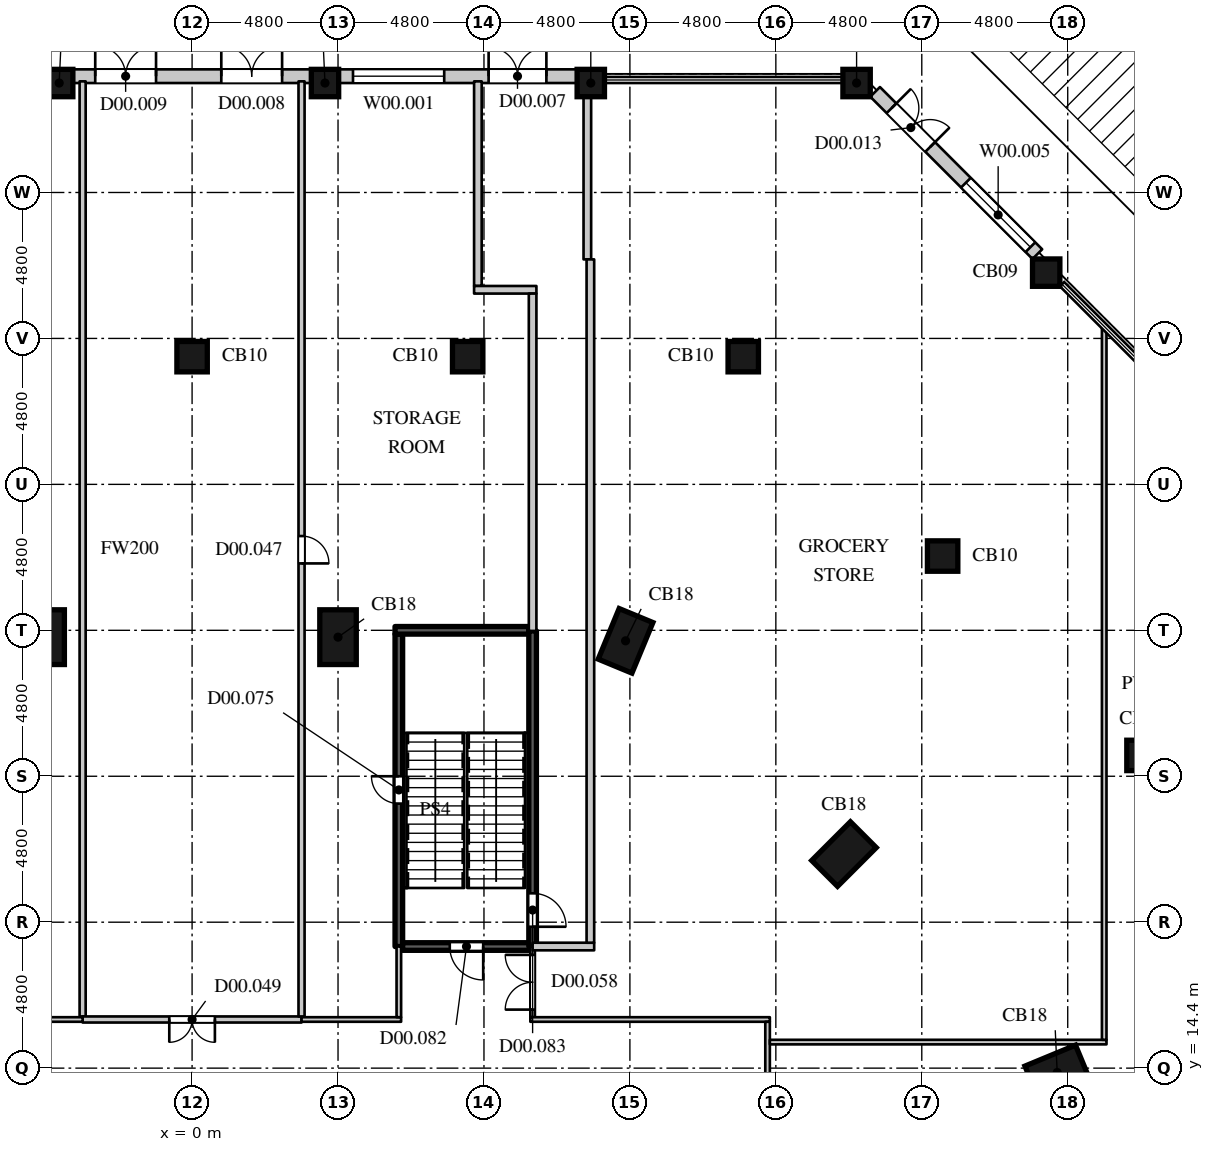
"""IFC4 building model, lengths in metres.
Left out: names, types, materials, properties, quantities, classifications, styles, units other than length and angle.
Written with IfcOpenShell. Run it as: python <this file> out.ifc"""

import sys

from ifc_helpers import new_model, si_unit, direction, frame, frame_2d, origin, origin_2d, place, context, subcontext, project, spatial, rectangle, extrude, element, fill, save


model = new_model("IFC4")
c1 = context("Model", 3, precision=1e-05, world=origin(), true_north=direction((0.0, 1.0)))
c2 = subcontext(c1, "Body", "Model", "MODEL_VIEW")
j1 = project(units=[si_unit("LENGTHUNIT", "METRE"), si_unit("PLANEANGLEUNIT", "RADIAN")], contexts=[c1])
p1 = place(None, origin())
s1 = spatial("IfcSite", under=j1, at=p1, CompositionType="ELEMENT")
p2 = place(p1, origin())
s2 = spatial("IfcBuilding", under=s1, at=p2, CompositionType="ELEMENT")
p3 = place(p2, origin())
s3 = spatial("IfcBuildingStorey", under=s2, at=p3, CompositionType="ELEMENT", Elevation=0.0)
for number, where, z_axis, x_axis in (
    (1, (28.454, 14.257, 0.0), (0.0, 0.0, 1.0), (-0.383, 0.924, 0.0)),
    (2, (21.441, 21.441, 0.0), (0.0, 0.0, 1.0), (-0.707, 0.707, 0.0)),
):
    element("IfcColumn", number, at=place(p3, frame(where, z_axis=z_axis, x_axis=x_axis)), inside=s3, PredefinedType="COLUMN", context=c2, shape_type="SweptSolid", body=[
        extrude(rectangle(XDim=1.2, YDim=1.8, at=origin_2d()), origin(), (0.0, 0.0, 1.0), 6.0),
    ])
p4 = place(p3, frame((31.243, 24.685, 0.0), z_axis=(0.0, 0.0, 1.0), x_axis=(1.0, 0.0, 0.0)))
e3 = element("IfcColumn", 3, at=p4, inside=s3, PredefinedType="COLUMN", context=c2, shape_type="SweptSolid", body=[
    extrude(rectangle(XDim=1.0, YDim=1.0, at=origin_2d()), origin(), (0.0, 0.0, 1.0), 6.0),
])
for number, where, z_axis, x_axis in (
    (4, (14.257, 28.454, 0.0), (0.0, 0.0, 1.0), (-0.924, 0.383, 0.0)),
    (5, (-4.8, 28.575, 0.0), (0.0, 0.0, 1.0), (-1.0, 0.0, 0.0)),
    (6, (4.8, 28.575, 0.0), (0.0, 0.0, 1.0), (-1.0, 0.0, 0.0)),
):
    element("IfcColumn", number, at=place(p3, frame(where, z_axis=z_axis, x_axis=x_axis)), inside=s3, PredefinedType="COLUMN", context=c2, shape_type="SweptSolid", body=[
        extrude(rectangle(XDim=1.2, YDim=1.8, at=origin_2d()), origin(), (0.0, 0.0, 1.0), 6.0),
    ])
for number, where, z_axis, x_axis in (
    (7, (24.685, 31.243, 0.0), (0.0, 0.0, 1.0), (1.0, 0.0, 0.0)),
    (8, (0.0, 37.8, 0.0), (0.0, 0.0, 1.0), (1.0, 0.0, 0.0)),
    (9, (9.064, 37.8, 0.0), (0.0, 0.0, 1.0), (1.0, 0.0, 0.0)),
    (10, (18.128, 37.8, 0.0), (0.0, 0.0, 1.0), (1.0, 0.0, 0.0)),
):
    element("IfcColumn", number, at=place(p3, frame(where, z_axis=z_axis, x_axis=x_axis)), inside=s3, PredefinedType="COLUMN", context=c2, shape_type="SweptSolid", body=[
        extrude(rectangle(XDim=1.0, YDim=1.0, at=origin_2d()), origin(), (0.0, 0.0, 1.0), 6.0),
    ])
for number, where, z_axis, x_axis in (
    (11, (28.092, 40.564, 0.0), (0.0, 0.0, 1.0), (1.0, 0.0, 0.0)),
    (12, (-4.371, 46.8, 0.0), (0.0, 0.0, 1.0), (1.0, 0.0, 0.0)),
    (13, (4.371, 46.8, 0.0), (0.0, 0.0, 1.0), (1.0, 0.0, 0.0)),
    (14, (13.114, 46.8, 0.0), (0.0, 0.0, 1.0), (1.0, 0.0, 0.0)),
    (15, (21.856, 46.8, 0.0), (0.0, 0.0, 1.0), (1.0, 0.0, 0.0)),
):
    element("IfcColumn", number, at=place(p3, frame(where, z_axis=z_axis, x_axis=x_axis)), inside=s3, PredefinedType="COLUMN", context=c2, shape_type="SweptSolid", body=[
        extrude(rectangle(XDim=0.9, YDim=0.9, at=origin_2d()), origin(), (0.0, 0.0, 1.0), 6.0),
    ])
p5 = place(p3, frame((27.801, 41.173, 0.0), z_axis=(0.0, 0.0, 1.0), x_axis=(-0.707122957123, 0.70709060488, 0.0)))
e16 = element("IfcWall", 16, at=p5, inside=s3, PredefinedType="ELEMENTEDWALL", context=c2, shape_type="SweptSolid", body=[
    extrude(rectangle(XDim=7.546, YDim=0.45, at=frame_2d((3.773, 0.0))), origin(), (0.0, 0.0, 1.0), 4.8),
])
p6 = place(p5, frame((0.323, 0.0, 1.05)))
e17 = element("IfcOpeningElement", 17, at=p6, cuts=e16, PredefinedType="OPENING", context=c2, shape_type="SweptSolid", body=[
    extrude(rectangle(XDim=3.0, YDim=2.7, at=frame_2d((1.5, 1.35))), frame((0.0, 0.235, 0.0), z_axis=(0.0, -1.0, 0.0), x_axis=(1.0, 0.0, 0.0)), (0.0, 0.0, 1.0), 0.47),
])
p7 = place(p5, frame((4.985, 0.0, 0.0)))
e18 = element("IfcOpeningElement", 18, at=p7, cuts=e16, PredefinedType="OPENING", context=c2, shape_type="SweptSolid", body=[
    extrude(rectangle(XDim=1.8, YDim=2.7, at=frame_2d((0.9, 1.35))), frame((0.0, 0.235, 0.0), z_axis=(0.0, -1.0, 0.0), x_axis=(1.0, 0.0, 0.0)), (0.0, 0.0, 1.0), 0.47),
])
p8 = place(p3, frame((12.664, 47.025, 0.0), z_axis=(0.0, 0.0, 1.0), x_axis=(-1.0, 0.0, 0.0)))
e19 = element("IfcWall", 19, at=p8, inside=s3, PredefinedType="ELEMENTEDWALL", context=c2, shape_type="SweptSolid", body=[
    extrude(rectangle(XDim=7.842, YDim=0.45, at=frame_2d((3.921, 0.0))), origin(), (0.0, 0.0, 1.0), 4.8),
])
p9 = place(p8, frame((1.01, 0.0, 0.0)))
e20 = element("IfcOpeningElement", 20, at=p9, cuts=e19, PredefinedType="OPENING", context=c2, shape_type="SweptSolid", body=[
    extrude(rectangle(XDim=1.9, YDim=2.7, at=frame_2d((0.95, 1.35))), frame((0.0, 0.235, 0.0), z_axis=(0.0, -1.0, 0.0), x_axis=(1.0, 0.0, 0.0)), (0.0, 0.0, 1.0), 0.47),
])
p10 = place(p8, frame((4.371, 0.0, 1.05)))
e21 = element("IfcOpeningElement", 21, at=p10, cuts=e19, PredefinedType="OPENING", context=c2, shape_type="SweptSolid", body=[
    extrude(rectangle(XDim=3.0, YDim=2.7, at=frame_2d((1.5, 1.35))), frame((0.0, 0.235, 0.0), z_axis=(0.0, -1.0, 0.0), x_axis=(1.0, 0.0, 0.0)), (0.0, 0.0, 1.0), 0.47),
])
p11 = place(p3, frame((3.921, 47.025, 0.0), z_axis=(0.0, 0.0, 1.0), x_axis=(-1.0, 0.0, 0.0)))
e22 = element("IfcWall", 22, at=p11, inside=s3, PredefinedType="ELEMENTEDWALL", context=c2, shape_type="SweptSolid", body=[
    extrude(rectangle(XDim=7.842, YDim=0.45, at=frame_2d((3.921, 0.0))), origin(), (0.0, 0.0, 1.0), 4.8),
])
p12 = place(p11, frame((0.961, 0.0, 0.0)))
e23 = element("IfcOpeningElement", 23, at=p12, cuts=e22, PredefinedType="OPENING", context=c2, shape_type="SweptSolid", body=[
    extrude(rectangle(XDim=2.0, YDim=2.7, at=frame_2d((1.0, 1.35))), frame((0.0, 0.235, 0.0), z_axis=(0.0, -1.0, 0.0), x_axis=(1.0, 0.0, 0.0)), (0.0, 0.0, 1.0), 0.47),
])
p13 = place(p11, frame((5.107, 0.0, 0.0)))
e24 = element("IfcOpeningElement", 24, at=p13, cuts=e22, PredefinedType="OPENING", context=c2, shape_type="SweptSolid", body=[
    extrude(rectangle(XDim=2.0, YDim=2.7, at=frame_2d((1.0, 1.35))), frame((0.0, 0.235, 0.0), z_axis=(0.0, -1.0, 0.0), x_axis=(1.0, 0.0, 0.0)), (0.0, 0.0, 1.0), 0.47),
])
p14 = place(p3, frame((-3.6, 16.1, 0.0), z_axis=(0.0, 0.0, 1.0), x_axis=(0.0, 1.0, 0.0)))
e25 = element("IfcWall", 25, at=p14, inside=s3, PredefinedType="PARTITIONING", context=c2, shape_type="SweptSolid", body=[
    extrude(rectangle(XDim=30.755, YDim=0.2, at=frame_2d((15.377, 0.0))), origin(), (0.0, 0.0, 1.0), 5.65),
])
p15 = place(p3, frame((-3.6, 16.0, 0.0), z_axis=(0.0, 0.0, 1.0), x_axis=(1.0, 0.0, 0.0)))
e26 = element("IfcWall", 26, at=p15, inside=s3, PredefinedType="PARTITIONING", context=c2, shape_type="SweptSolid", body=[
    extrude(rectangle(XDim=7.2, YDim=0.2, at=frame_2d((3.6, 0.0))), origin(), (0.0, 0.0, 1.0), 5.65),
])
p16 = place(p15, frame((2.85, 0.0, 0.0)))
e27 = element("IfcOpeningElement", 27, at=p16, cuts=e26, PredefinedType="OPENING", context=c2, shape_type="SweptSolid", body=[
    extrude(rectangle(XDim=1.5, YDim=2.2, at=frame_2d((0.75, 1.1))), frame((0.0, 0.11, 0.0), z_axis=(0.0, -1.0, 0.0), x_axis=(1.0, 0.0, 0.0)), (0.0, 0.0, 1.0), 0.22),
])
p17 = place(p3, frame((3.6, 16.1, 0.0), z_axis=(0.0, 0.0, 1.0), x_axis=(0.0, 1.0, 0.0)))
e28 = element("IfcWall", 28, at=p17, inside=s3, PredefinedType="PARTITIONING", context=c2, shape_type="SweptSolid", body=[
    extrude(rectangle(XDim=30.755, YDim=0.2, at=frame_2d((15.377, 0.0))), origin(), (0.0, 0.0, 1.0), 5.65),
])
p18 = place(p17, frame((14.9, 0.0, 0.0)))
e29 = element("IfcOpeningElement", 29, at=p18, cuts=e28, PredefinedType="OPENING", context=c2, shape_type="SweptSolid", body=[
    extrude(rectangle(XDim=0.9, YDim=2.2, at=frame_2d((0.45, 1.1))), frame((0.0, 0.11, 0.0), z_axis=(0.0, -1.0, 0.0), x_axis=(1.0, 0.0, 0.0)), (0.0, 0.0, 1.0), 0.22),
])
for number, where, z_axis, x_axis in (
    (30, (-6.875, 16.0, 0.0), (0.0, 0.0, 1.0), (1.0, 0.0, 0.0)),
    (31, (3.6, 16.0, 0.0), (0.0, 0.0, 1.0), (1.0, 0.0, 0.0)),
):
    element("IfcWall", number, at=place(p3, frame(where, z_axis=z_axis, x_axis=x_axis)), inside=s3, PredefinedType="PARTITIONING", context=c2, shape_type="SweptSolid", body=[
        extrude(rectangle(XDim=3.275, YDim=0.15, at=frame_2d((1.637, 0.0))), origin(), (0.0, 0.0, 1.0), 5.65),
    ])
p19 = place(p3, frame((6.8, 16.075, 0.0), z_axis=(0.0, 0.0, 1.0), x_axis=(0.0, 1.0, 0.0)))
e32 = element("IfcWall", 32, at=p19, inside=s3, PredefinedType="PARTITIONING", context=c2, shape_type="SweptSolid", body=[
    extrude(rectangle(XDim=2.325, YDim=0.15, at=frame_2d((1.163, 0.0))), origin(), (0.0, 0.0, 1.0), 5.65),
])
p20 = place(p3, frame((11.2, 16.075, 0.0), z_axis=(0.0, 0.0, 1.0), x_axis=(0.0, 1.0, 0.0)))
e33 = element("IfcWall", 33, at=p20, inside=s3, PredefinedType="PARTITIONING", context=c2, shape_type="SweptSolid", body=[
    extrude(rectangle(XDim=2.325, YDim=0.15, at=frame_2d((1.163, 0.0))), origin(), (0.0, 0.0, 1.0), 5.65),
])
p21 = place(p20, frame((0.25, 0.0, 0.0)))
e34 = element("IfcOpeningElement", 34, at=p21, cuts=e33, PredefinedType="OPENING", context=c2, shape_type="SweptSolid", body=[
    extrude(rectangle(XDim=1.8, YDim=2.4, at=frame_2d((0.9, 1.2))), frame((0.0, 0.085, 0.0), z_axis=(0.0, -1.0, 0.0), x_axis=(1.0, 0.0, 0.0)), (0.0, 0.0, 1.0), 0.17),
])
p22 = place(p3, frame((11.125, 16.0, 0.0), z_axis=(0.0, 0.0, 1.0), x_axis=(1.0, 0.0, 0.0)))
e35 = element("IfcWall", 35, at=p22, inside=s3, PredefinedType="PARTITIONING", context=c2, shape_type="SweptSolid", body=[
    extrude(rectangle(XDim=7.878, YDim=0.15, at=frame_2d((3.939, 0.0))), origin(), (0.0, 0.0, 1.0), 5.65),
])
p23 = place(p3, frame((18.928, 13.225, 0.0), z_axis=(0.0, 0.0, 1.0), x_axis=(0.0, 1.0, 0.0)))
e36 = element("IfcWall", 36, at=p23, inside=s3, PredefinedType="PARTITIONING", context=c2, shape_type="SweptSolid", body=[
    extrude(rectangle(XDim=2.7, YDim=0.15, at=frame_2d((1.35, 0.0))), origin(), (0.0, 0.0, 1.0), 5.65),
])
p24 = place(p3, frame((19.003, 15.257, 0.0), z_axis=(0.0, 0.0, 1.0), x_axis=(1.0, 0.0, 0.0)))
e37 = element("IfcWall", 37, at=p24, inside=s3, PredefinedType="PARTITIONING", context=c2, shape_type="SweptSolid", body=[
    extrude(rectangle(XDim=11.072, YDim=0.15, at=frame_2d((5.536, 0.0))), origin(), (0.0, 0.0, 1.0), 5.65),
])
p25 = place(p3, frame((30.0, 15.332, 0.0), z_axis=(0.0, 0.0, 1.0), x_axis=(0.0, 1.0, 0.0)))
e38 = element("IfcWall", 38, at=p25, inside=s3, PredefinedType="PARTITIONING", context=c2, shape_type="SweptSolid", body=[
    extrude(rectangle(XDim=23.402, YDim=0.15, at=frame_2d((11.701, 0.0))), origin(), (0.0, 0.0, 1.0), 5.65),
])
p26 = place(p3, frame((6.8, 18.4, 0.0), z_axis=(0.0, 0.0, 1.0), x_axis=(0.0, 1.0, 0.0)))
e39 = element("IfcWall", 39, at=p26, inside=s3, PredefinedType="SHEAR", context=c2, shape_type="SweptSolid", body=[
    extrude(rectangle(XDim=10.275, YDim=0.25, at=frame_2d((5.138, 0.0))), origin(), (0.0, 0.0, 1.0), 5.65),
])
p27 = place(p26, frame((4.7, 0.0, 0.0)))
e40 = element("IfcOpeningElement", 40, at=p27, cuts=e39, PredefinedType="OPENING", context=c2, shape_type="SweptSolid", body=[
    extrude(rectangle(XDim=0.9, YDim=2.2, at=frame_2d((0.45, 1.1))), frame((0.0, 0.135, 0.0), z_axis=(0.0, -1.0, 0.0), x_axis=(1.0, 0.0, 0.0)), (0.0, 0.0, 1.0), 0.27),
])
p28 = place(p3, frame((6.925, 18.4, 0.0), z_axis=(0.0, 0.0, 1.0), x_axis=(1.0, 0.0, 0.0)))
e41 = element("IfcWall", 41, at=p28, inside=s3, PredefinedType="SHEAR", context=c2, shape_type="SweptSolid", body=[
    extrude(rectangle(XDim=4.275, YDim=0.25, at=frame_2d((2.137, 0.0))), origin(), (0.0, 0.0, 1.0), 5.65),
])
p29 = place(p28, frame((1.55, 0.0, 0.0)))
e42 = element("IfcOpeningElement", 42, at=p29, cuts=e41, PredefinedType="OPENING", context=c2, shape_type="SweptSolid", body=[
    extrude(rectangle(XDim=1.1, YDim=2.2, at=frame_2d((0.55, 1.1))), frame((0.0, 0.135, 0.0), z_axis=(0.0, -1.0, 0.0), x_axis=(1.0, 0.0, 0.0)), (0.0, 0.0, 1.0), 0.27),
])
p30 = place(p3, frame((6.675, 28.8, 0.0), z_axis=(0.0, 0.0, 1.0), x_axis=(1.0, 0.0, 0.0)))
e43 = element("IfcWall", 43, at=p30, inside=s3, PredefinedType="SHEAR", context=c2, shape_type="SweptSolid", body=[
    extrude(rectangle(XDim=4.4, YDim=0.25, at=frame_2d((2.2, 0.0))), origin(), (0.0, 0.0, 1.0), 5.65),
])
p31 = place(p3, frame((11.2, 18.4, 0.0), z_axis=(0.0, 0.0, 1.0), x_axis=(0.0, 1.0, 0.0)))
e44 = element("IfcWall", 44, at=p31, inside=s3, PredefinedType="SHEAR", context=c2, shape_type="SweptSolid", body=[
    extrude(rectangle(XDim=10.38, YDim=0.25, at=frame_2d((5.19, 0.0))), origin(), (0.0, 0.0, 1.0), 5.65),
])
p32 = place(p31, frame((0.65, 0.0, 0.0)))
e45 = element("IfcOpeningElement", 45, at=p32, cuts=e44, PredefinedType="OPENING", context=c2, shape_type="SweptSolid", body=[
    extrude(rectangle(XDim=1.1, YDim=2.2, at=frame_2d((0.55, 1.1))), frame((0.0, 0.135, 0.0), z_axis=(0.0, -1.0, 0.0), x_axis=(1.0, 0.0, 0.0)), (0.0, 0.0, 1.0), 0.27),
])
p33 = place(p3, frame((9.4, 40.125, 0.0), z_axis=(0.0, 0.0, 1.0), x_axis=(0.0, 1.0, 0.0)))
e46 = element("IfcWall", 46, at=p33, inside=s3, PredefinedType="PARTITIONING", context=c2, shape_type="SweptSolid", body=[
    extrude(rectangle(XDim=6.73, YDim=0.25, at=frame_2d((3.365, 0.0))), origin(), (0.0, 0.0, 1.0), 5.65),
])
p34 = place(p3, frame((9.275, 40.0, 0.0), z_axis=(0.0, 0.0, 1.0), x_axis=(1.0, 0.0, 0.0)))
e47 = element("IfcWall", 47, at=p34, inside=s3, PredefinedType="PARTITIONING", context=c2, shape_type="SweptSolid", body=[
    extrude(rectangle(XDim=2.05, YDim=0.25, at=frame_2d((1.025, 0.0))), origin(), (0.0, 0.0, 1.0), 5.65),
])
p35 = place(p3, frame((11.2, 18.4, 0.0), z_axis=(0.0, 0.0, 1.0), x_axis=(1.0, 0.0, 0.0)))
e48 = element("IfcWall", 48, at=p35, inside=s3, PredefinedType="PARTITIONING", context=c2, shape_type="SweptSolid", body=[
    extrude(rectangle(XDim=2.025, YDim=0.25, at=frame_2d((1.013, 0.0))), origin(), (0.0, 0.0, 1.0), 5.65),
])
p36 = place(p3, frame((11.2, 28.78, 0.0), z_axis=(0.0, 0.0, 1.0), x_axis=(0.0, 1.0, 0.0)))
e49 = element("IfcWall", 49, at=p36, inside=s3, PredefinedType="PARTITIONING", context=c2, shape_type="SweptSolid", body=[
    extrude(rectangle(XDim=11.095, YDim=0.25, at=frame_2d((5.547, 0.0))), origin(), (0.0, 0.0, 1.0), 5.65),
])
p37 = place(p3, frame((13.0, 41.0, 0.0), z_axis=(0.0, 0.0, 1.0), x_axis=(0.0, 1.0, 0.0)))
e50 = element("IfcWall", 50, at=p37, inside=s3, PredefinedType="PARTITIONING", context=c2, shape_type="SweptSolid", body=[
    extrude(rectangle(XDim=5.35, YDim=0.25, at=frame_2d((2.675, 0.0))), origin(), (0.0, 0.0, 1.0), 5.65),
])
p38 = place(p3, frame((13.1, 18.525, 0.0), z_axis=(0.0, 0.0, 1.0), x_axis=(0.0, 1.0, 0.0)))
e51 = element("IfcWall", 51, at=p38, inside=s3, PredefinedType="PARTITIONING", context=c2, shape_type="SweptSolid", body=[
    extrude(rectangle(XDim=22.475, YDim=0.25, at=frame_2d((11.238, 0.0))), origin(), (0.0, 0.0, 1.0), 5.65),
])
p39 = place(p6, origin())
e52 = element("IfcWindow", 52, at=p39, inside=s3, PartitioningType="SINGLE_PANEL", PredefinedType="WINDOW", context=c2, shape_type="SweptSolid", body=[
    extrude(rectangle(XDim=3.0, YDim=2.7, at=frame_2d((1.5, 1.35))), frame((0.0, 0.135, 0.0), z_axis=(0.0, -1.0, 0.0), x_axis=(1.0, 0.0, 0.0)), (0.0, 0.0, 1.0), 0.06),
])
fill(e17, e52)
p40 = place(p7, frame((1.8, 0.0, 0.0), z_axis=(0.0, 0.0, 1.0), x_axis=(-1.0, 0.0, 0.0)))
e53 = element("IfcDoor", 53, at=p40, inside=s3, OperationType="DOUBLE_DOOR_SINGLE_SWING", PredefinedType="DOOR", context=c2, shape_type="SweptSolid", body=[
    extrude(rectangle(XDim=1.8, YDim=2.7, at=frame_2d((0.9, 1.35))), frame((0.0, -0.08, 0.0), z_axis=(0.0, -1.0, 0.0), x_axis=(1.0, 0.0, 0.0)), (0.0, 0.0, 1.0), 0.05),
])
fill(e18, e53)
p41 = place(p9, frame((1.9, 0.0, 0.0), z_axis=(0.0, 0.0, 1.0), x_axis=(-1.0, 0.0, 0.0)))
e54 = element("IfcDoor", 54, at=p41, inside=s3, OperationType="DOUBLE_DOOR_SINGLE_SWING", PredefinedType="DOOR", context=c2, shape_type="SweptSolid", body=[
    extrude(rectangle(XDim=1.9, YDim=2.7, at=frame_2d((0.95, 1.35))), frame((0.0, -0.08, 0.0), z_axis=(0.0, -1.0, 0.0), x_axis=(1.0, 0.0, 0.0)), (0.0, 0.0, 1.0), 0.05),
])
fill(e20, e54)
p42 = place(p10, origin())
e55 = element("IfcWindow", 55, at=p42, inside=s3, PartitioningType="SINGLE_PANEL", PredefinedType="WINDOW", context=c2, shape_type="SweptSolid", body=[
    extrude(rectangle(XDim=3.0, YDim=2.7, at=frame_2d((1.5, 1.35))), frame((0.0, 0.135, 0.0), z_axis=(0.0, -1.0, 0.0), x_axis=(1.0, 0.0, 0.0)), (0.0, 0.0, 1.0), 0.06),
])
fill(e21, e55)
p43 = place(p12, frame((2.0, 0.0, 0.0), z_axis=(0.0, 0.0, 1.0), x_axis=(-1.0, 0.0, 0.0)))
e56 = element("IfcDoor", 56, at=p43, inside=s3, OperationType="DOUBLE_DOOR_SINGLE_SWING", PredefinedType="DOOR", context=c2, shape_type="SweptSolid", body=[
    extrude(rectangle(XDim=2.0, YDim=2.7, at=frame_2d((1.0, 1.35))), frame((0.0, -0.08, 0.0), z_axis=(0.0, -1.0, 0.0), x_axis=(1.0, 0.0, 0.0)), (0.0, 0.0, 1.0), 0.05),
])
fill(e23, e56)
p44 = place(p13, frame((2.0, 0.0, 0.0), z_axis=(0.0, 0.0, 1.0), x_axis=(-1.0, 0.0, 0.0)))
e57 = element("IfcDoor", 57, at=p44, inside=s3, OperationType="DOUBLE_DOOR_SINGLE_SWING", PredefinedType="DOOR", context=c2, shape_type="SweptSolid", body=[
    extrude(rectangle(XDim=2.0, YDim=2.7, at=frame_2d((1.0, 1.35))), frame((0.0, -0.08, 0.0), z_axis=(0.0, -1.0, 0.0), x_axis=(1.0, 0.0, 0.0)), (0.0, 0.0, 1.0), 0.05),
])
fill(e24, e57)
p45 = place(p18, origin())
e58 = element("IfcDoor", 58, at=p45, inside=s3, OperationType="SINGLE_SWING_RIGHT", PredefinedType="DOOR", context=c2, shape_type="SweptSolid", body=[
    extrude(rectangle(XDim=0.9, YDim=2.2, at=frame_2d((0.45, 1.1))), frame((0.0, 0.025, 0.0), z_axis=(0.0, -1.0, 0.0), x_axis=(1.0, 0.0, 0.0)), (0.0, 0.0, 1.0), 0.05),
])
fill(e29, e58)
p46 = place(p16, origin())
e59 = element("IfcDoor", 59, at=p46, inside=s3, OperationType="DOUBLE_DOOR_SINGLE_SWING", PredefinedType="DOOR", context=c2, shape_type="SweptSolid", body=[
    extrude(rectangle(XDim=1.5, YDim=2.2, at=frame_2d((0.75, 1.1))), frame((0.0, 0.025, 0.0), z_axis=(0.0, -1.0, 0.0), x_axis=(1.0, 0.0, 0.0)), (0.0, 0.0, 1.0), 0.05),
])
fill(e27, e59)
p47 = place(p21, origin())
e60 = element("IfcDoor", 60, at=p47, inside=s3, OperationType="DOUBLE_DOOR_SINGLE_SWING", PredefinedType="DOOR", context=c2, shape_type="SweptSolid", body=[
    extrude(rectangle(XDim=1.8, YDim=2.4, at=frame_2d((0.9, 1.2))), frame((0.0, 0.025, 0.0), z_axis=(0.0, -1.0, 0.0), x_axis=(1.0, 0.0, 0.0)), (0.0, 0.0, 1.0), 0.05),
])
fill(e34, e60)
p48 = place(p27, origin())
e61 = element("IfcDoor", 61, at=p48, inside=s3, OperationType="SINGLE_SWING_RIGHT", PredefinedType="DOOR", context=c2, shape_type="SweptSolid", body=[
    extrude(rectangle(XDim=0.9, YDim=2.2, at=frame_2d((0.45, 1.1))), frame((0.0, 0.025, 0.0), z_axis=(0.0, -1.0, 0.0), x_axis=(1.0, 0.0, 0.0)), (0.0, 0.0, 1.0), 0.05),
])
fill(e40, e61)
p49 = place(p29, origin())
e62 = element("IfcDoor", 62, at=p49, inside=s3, OperationType="SINGLE_SWING_LEFT", PredefinedType="DOOR", context=c2, shape_type="SweptSolid", body=[
    extrude(rectangle(XDim=1.1, YDim=2.2, at=frame_2d((0.55, 1.1))), frame((0.0, 0.025, 0.0), z_axis=(0.0, -1.0, 0.0), x_axis=(1.0, 0.0, 0.0)), (0.0, 0.0, 1.0), 0.05),
])
fill(e42, e62)
p50 = place(p32, origin())
e63 = element("IfcDoor", 63, at=p50, inside=s3, OperationType="SINGLE_SWING_RIGHT", PredefinedType="DOOR", context=c2, shape_type="SweptSolid", body=[
    extrude(rectangle(XDim=1.1, YDim=2.2, at=frame_2d((0.55, 1.1))), frame((0.0, 0.025, 0.0), z_axis=(0.0, -1.0, 0.0), x_axis=(1.0, 0.0, 0.0)), (0.0, 0.0, 1.0), 0.05),
])
fill(e45, e63)
save(model, sys.argv[1])
